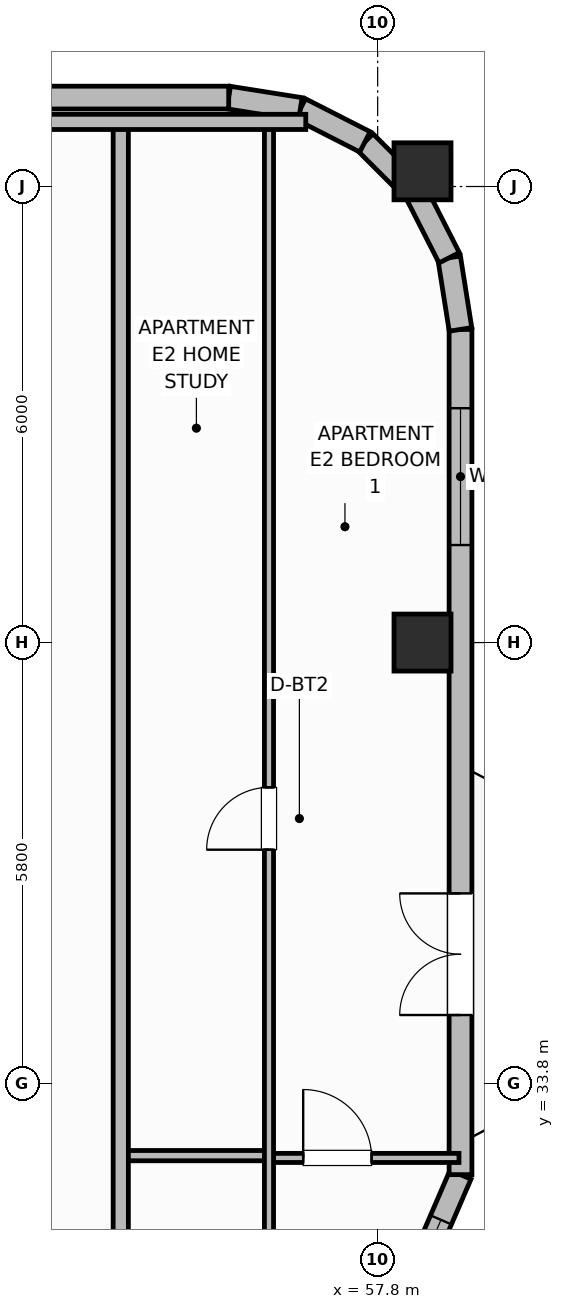
"""IFC4 building model, lengths in metres.
Left out: names, types, materials, properties, quantities, classifications, styles, units other than length and angle.
Written with IfcOpenShell. Run it as: python <this file> out.ifc"""

import sys

from ifc_helpers import new_model, si_unit, direction, frame, frame_2d, origin, origin_2d, place, context, subcontext, project, spatial, rectangle, extrude, element, fill, save


model = new_model("IFC4")
c1 = context("Model", 3, precision=1e-05, world=origin(), true_north=direction((0.0, 1.0)))
c2 = subcontext(c1, "Body", "Model", "MODEL_VIEW")
j1 = project(units=[si_unit("LENGTHUNIT", "METRE"), si_unit("PLANEANGLEUNIT", "RADIAN")], contexts=[c1])
p1 = place(None, origin())
s1 = spatial("IfcSite", under=j1, at=p1, CompositionType="ELEMENT")
p2 = place(p1, origin())
s2 = spatial("IfcBuilding", under=s1, at=p2, CompositionType="ELEMENT")
p3 = place(p2, frame((0.0, 0.0, 289.8)))
s3 = spatial("IfcBuildingStorey", under=s2, at=p3, CompositionType="ELEMENT", Elevation=289.8)
for number, where, z_axis, x_axis in (
    (1, (58.39, 39.6, 0.0), (0.0, 0.0, 1.0), (1.0, 0.0, 0.0)),
    (2, (58.39, 45.8, 0.0), (0.0, 0.0, 1.0), (1.0, 0.0, 0.0)),
):
    element("IfcColumn", number, at=place(p3, frame(where, z_axis=z_axis, x_axis=x_axis)), inside=s3, PredefinedType="COLUMN", context=c2, shape_type="SweptSolid", body=[
        extrude(rectangle(XDim=0.75, YDim=0.75, at=origin_2d()), origin(), (0.0, 0.0, 1.0), 3.7),
    ])
p4 = place(p3, frame((57.94, 30.4, 0.0), z_axis=(0.0, 0.0, 1.0), x_axis=(0.396389181543, 0.918082576218, 0.0)))
e3 = element("IfcWall", 3, at=p4, inside=s3, PredefinedType="SOLIDWALL", context=c2, shape_type="SweptSolid", body=[
    extrude(rectangle(XDim=2.396, YDim=0.3, at=frame_2d((1.198, 0.0))), origin(), (0.0, 0.0, 1.0), 2.73),
])
p5 = place(p4, frame((0.648, 0.0, 0.92)))
e4 = element("IfcOpeningElement", 4, at=p5, cuts=e3, PredefinedType="OPENING", context=c2, shape_type="SweptSolid", body=[
    extrude(rectangle(XDim=1.1, YDim=1.65, at=frame_2d((0.55, 0.825))), frame((0.0, 0.16, 0.0), z_axis=(0.0, -1.0, 0.0), x_axis=(1.0, 0.0, 0.0)), (0.0, 0.0, 1.0), 0.32),
])
p6 = place(p3, frame((58.89, 32.6, 0.0), z_axis=(0.0, 0.0, 1.0), x_axis=(0.0, 1.0, 0.0)))
e5 = element("IfcWall", 5, at=p6, inside=s3, PredefinedType="SOLIDWALL", context=c2, shape_type="SweptSolid", body=[
    extrude(rectangle(XDim=11.12, YDim=0.3, at=frame_2d((5.56, 0.0))), origin(), (0.0, 0.0, 1.0), 2.73),
])
p7 = place(p6, frame((2.1, 0.0, 0.0)))
e6 = element("IfcOpeningElement", 6, at=p7, cuts=e5, PredefinedType="OPENING", context=c2, shape_type="SweptSolid", body=[
    extrude(rectangle(XDim=1.6, YDim=2.1, at=frame_2d((0.8, 1.05))), frame((0.0, 0.16, 0.0), z_axis=(0.0, -1.0, 0.0), x_axis=(1.0, 0.0, 0.0)), (0.0, 0.0, 1.0), 0.32),
])
p8 = place(p6, frame((8.283, 0.0, 0.76)))
e7 = element("IfcOpeningElement", 7, at=p8, cuts=e5, PredefinedType="OPENING", context=c2, shape_type="SweptSolid", body=[
    extrude(rectangle(XDim=1.8, YDim=1.85, at=frame_2d((0.9, 0.925))), frame((0.0, 0.16, 0.0), z_axis=(0.0, -1.0, 0.0), x_axis=(1.0, 0.0, 0.0)), (0.0, 0.0, 1.0), 0.32),
])
p9 = place(p3, frame((58.89, 43.72, 0.0), z_axis=(0.0, 0.0, 1.0), x_axis=(-0.156304114255, 0.987708977314, 0.0)))
e8 = element("IfcWall", 8, at=p9, inside=s3, PredefinedType="SOLIDWALL", context=c2, shape_type="SweptSolid", body=[
    extrude(rectangle(XDim=0.954, YDim=0.3, at=frame_2d((0.477, 0.0))), origin(), (0.0, 0.0, 1.0), 2.73),
])
p10 = place(p3, frame((58.741, 44.663, 0.0), z_axis=(0.0, 0.0, 1.0), x_axis=(-0.45395644796, 0.891023873617, 0.0)))
e9 = element("IfcWall", 9, at=p10, inside=s3, PredefinedType="SOLIDWALL", context=c2, shape_type="SweptSolid", body=[
    extrude(rectangle(XDim=0.954, YDim=0.3, at=frame_2d((0.477, 0.0))), origin(), (0.0, 0.0, 1.0), 2.73),
])
for number, where, z_axis, x_axis in (
    (10, (58.308, 45.513, 0.0), (0.0, 0.0, 1.0), (-0.707, 0.707, 0.0)),
    (11, (57.633, 46.188, 0.0), (0.0, 0.0, 1.0), (-0.891, 0.454, 0.0)),
):
    element("IfcWall", number, at=place(p3, frame(where, z_axis=z_axis, x_axis=x_axis)), inside=s3, PredefinedType="SOLIDWALL", context=c2, shape_type="SweptSolid", body=[
        extrude(rectangle(XDim=0.954, YDim=0.3, at=frame_2d((0.477, 0.0))), origin(), (0.0, 0.0, 1.0), 2.73),
    ])
p11 = place(p3, frame((56.782, 46.621, 0.0), z_axis=(0.0, 0.0, 1.0), x_axis=(-0.987663181641, 0.156593229835, 0.0)))
e12 = element("IfcWall", 12, at=p11, inside=s3, PredefinedType="SOLIDWALL", context=c2, shape_type="SweptSolid", body=[
    extrude(rectangle(XDim=0.954, YDim=0.3, at=frame_2d((0.477, 0.0))), origin(), (0.0, 0.0, 1.0), 2.73),
])
p12 = place(p3, frame((55.84, 46.77, 0.0), z_axis=(0.0, 0.0, 1.0), x_axis=(-1.0, 0.0, 0.0)))
e13 = element("IfcWall", 13, at=p12, inside=s3, PredefinedType="SOLIDWALL", context=c2, shape_type="SweptSolid", body=[
    extrude(rectangle(XDim=4.45, YDim=0.3, at=frame_2d((2.225, 0.0))), origin(), (0.0, 0.0, 1.0), 2.73),
])
p13 = place(p3, frame((54.42, 32.85, 0.0), z_axis=(0.0, 0.0, 1.0), x_axis=(1.0, 0.0, 0.0)))
e14 = element("IfcWall", 14, at=p13, inside=s3, PredefinedType="PARTITIONING", context=c2, shape_type="SweptSolid", body=[
    extrude(rectangle(XDim=1.95, YDim=0.135, at=frame_2d((0.975, 0.0))), origin(), (0.0, 0.0, 1.0), 2.56),
])
p14 = place(p3, frame((56.37, 32.82, 0.0), z_axis=(0.0, 0.0, 1.0), x_axis=(1.0, 0.0, 0.0)))
e15 = element("IfcWall", 15, at=p14, inside=s3, PredefinedType="PARTITIONING", context=c2, shape_type="SweptSolid", body=[
    extrude(rectangle(XDim=2.5, YDim=0.12, at=frame_2d((1.25, 0.0))), origin(), (0.0, 0.0, 1.0), 2.56),
])
p15 = place(p14, frame((0.45, 0.0, 0.0)))
e16 = element("IfcOpeningElement", 16, at=p15, cuts=e15, PredefinedType="OPENING", context=c2, shape_type="SweptSolid", body=[
    extrude(rectangle(XDim=0.9, YDim=2.1, at=frame_2d((0.45, 1.05))), frame((0.0, 0.07, 0.0), z_axis=(0.0, -1.0, 0.0), x_axis=(1.0, 0.0, 0.0)), (0.0, 0.0, 1.0), 0.14),
])
p16 = place(p3, frame((56.37, 23.69, 0.0), z_axis=(0.0, 0.0, 1.0), x_axis=(0.0, 1.0, 0.0)))
e17 = element("IfcWall", 17, at=p16, inside=s3, PredefinedType="PARTITIONING", context=c2, shape_type="SweptSolid", body=[
    extrude(rectangle(XDim=22.72, YDim=0.12, at=frame_2d((11.36, 0.0))), origin(), (0.0, 0.0, 1.0), 2.56),
])
p17 = place(p16, frame((0.41, 0.0, 0.0)))
e18 = element("IfcOpeningElement", 18, at=p17, cuts=e17, PredefinedType="OPENING", context=c2, shape_type="SweptSolid", body=[
    extrude(rectangle(XDim=0.9, YDim=2.1, at=frame_2d((0.45, 1.05))), frame((0.0, 0.07, 0.0), z_axis=(0.0, -1.0, 0.0), x_axis=(1.0, 0.0, 0.0)), (0.0, 0.0, 1.0), 0.14),
])
p18 = place(p16, frame((13.185, 0.0, 0.0)))
e19 = element("IfcOpeningElement", 19, at=p18, cuts=e17, PredefinedType="OPENING", context=c2, shape_type="SweptSolid", body=[
    extrude(rectangle(XDim=0.82, YDim=2.08, at=frame_2d((0.41, 1.04))), frame((0.0, 0.07, 0.0), z_axis=(0.0, -1.0, 0.0), x_axis=(1.0, 0.0, 0.0)), (0.0, 0.0, 1.0), 0.14),
])
p19 = place(p3, frame((54.42, 9.95, 0.0), z_axis=(0.0, 0.0, 1.0), x_axis=(0.0, 1.0, 0.0)))
e20 = element("IfcWall", 20, at=p19, inside=s3, PredefinedType="PARTITIONING", context=c2, shape_type="SweptSolid", body=[
    extrude(rectangle(XDim=36.5, YDim=0.2, at=frame_2d((18.25, 0.0))), origin(), (0.0, 0.0, 1.0), 2.56),
])
p20 = place(p19, frame((3.25, 0.0, 0.0)))
e21 = element("IfcOpeningElement", 21, at=p20, cuts=e20, PredefinedType="OPENING", context=c2, shape_type="SweptSolid", body=[
    extrude(rectangle(XDim=1.0, YDim=2.15, at=frame_2d((0.5, 1.075))), frame((0.0, 0.11, 0.0), z_axis=(0.0, -1.0, 0.0), x_axis=(1.0, 0.0, 0.0)), (0.0, 0.0, 1.0), 0.22),
])
p21 = place(p19, frame((14.25, 0.0, 0.0)))
e22 = element("IfcOpeningElement", 22, at=p21, cuts=e20, PredefinedType="OPENING", context=c2, shape_type="SweptSolid", body=[
    extrude(rectangle(XDim=1.0, YDim=2.15, at=frame_2d((0.5, 1.075))), frame((0.0, 0.11, 0.0), z_axis=(0.0, -1.0, 0.0), x_axis=(1.0, 0.0, 0.0)), (0.0, 0.0, 1.0), 0.22),
])
p22 = place(p3, frame((53.1, 46.45, 0.0), z_axis=(0.0, 0.0, 1.0), x_axis=(1.0, 0.0, 0.0)))
e23 = element("IfcWall", 23, at=p22, inside=s3, PredefinedType="PARTITIONING", context=c2, shape_type="SweptSolid", body=[
    extrude(rectangle(XDim=3.754, YDim=0.2, at=frame_2d((1.877, 0.0))), origin(), (0.0, 0.0, 1.0), 2.56),
])
p23 = place(p5, origin())
e24 = element("IfcWindow", 24, at=p23, inside=s3, PartitioningType="SINGLE_PANEL", PredefinedType="WINDOW", context=c2, shape_type="SweptSolid", body=[
    extrude(rectangle(XDim=1.1, YDim=1.65, at=frame_2d((0.55, 0.825))), frame((0.0, 0.03, 0.0), z_axis=(0.0, -1.0, 0.0), x_axis=(1.0, 0.0, 0.0)), (0.0, 0.0, 1.0), 0.06),
])
fill(e4, e24)
p24 = place(p7, origin())
e25 = element("IfcDoor", 25, at=p24, inside=s3, OperationType="DOUBLE_DOOR_SINGLE_SWING", PredefinedType="DOOR", context=c2, shape_type="SweptSolid", body=[
    extrude(rectangle(XDim=1.6, YDim=2.1, at=frame_2d((0.8, 1.05))), frame((0.0, 0.025, 0.0), z_axis=(0.0, -1.0, 0.0), x_axis=(1.0, 0.0, 0.0)), (0.0, 0.0, 1.0), 0.05),
])
fill(e6, e25)
p25 = place(p8, origin())
e26 = element("IfcWindow", 26, at=p25, inside=s3, PartitioningType="SINGLE_PANEL", PredefinedType="WINDOW", context=c2, shape_type="SweptSolid", body=[
    extrude(rectangle(XDim=1.8, YDim=1.85, at=frame_2d((0.9, 0.925))), frame((0.0, 0.03, 0.0), z_axis=(0.0, -1.0, 0.0), x_axis=(1.0, 0.0, 0.0)), (0.0, 0.0, 1.0), 0.06),
])
fill(e7, e26)
p26 = place(p15, origin())
e27 = element("IfcDoor", 27, at=p26, inside=s3, OperationType="SINGLE_SWING_LEFT", PredefinedType="DOOR", context=c2, shape_type="SweptSolid", body=[
    extrude(rectangle(XDim=0.9, YDim=2.1, at=frame_2d((0.45, 1.05))), frame((0.0, 0.025, 0.0), z_axis=(0.0, -1.0, 0.0), x_axis=(1.0, 0.0, 0.0)), (0.0, 0.0, 1.0), 0.05),
])
fill(e16, e27)
p27 = place(p18, origin())
e28 = element("IfcDoor", 28, at=p27, inside=s3, OperationType="SINGLE_SWING_LEFT", PredefinedType="DOOR", context=c2, shape_type="SweptSolid", body=[
    extrude(rectangle(XDim=0.82, YDim=2.08, at=frame_2d((0.41, 1.04))), frame((0.0, 0.025, 0.0), z_axis=(0.0, -1.0, 0.0), x_axis=(1.0, 0.0, 0.0)), (0.0, 0.0, 1.0), 0.05),
])
fill(e19, e28)
save(model, sys.argv[1])
